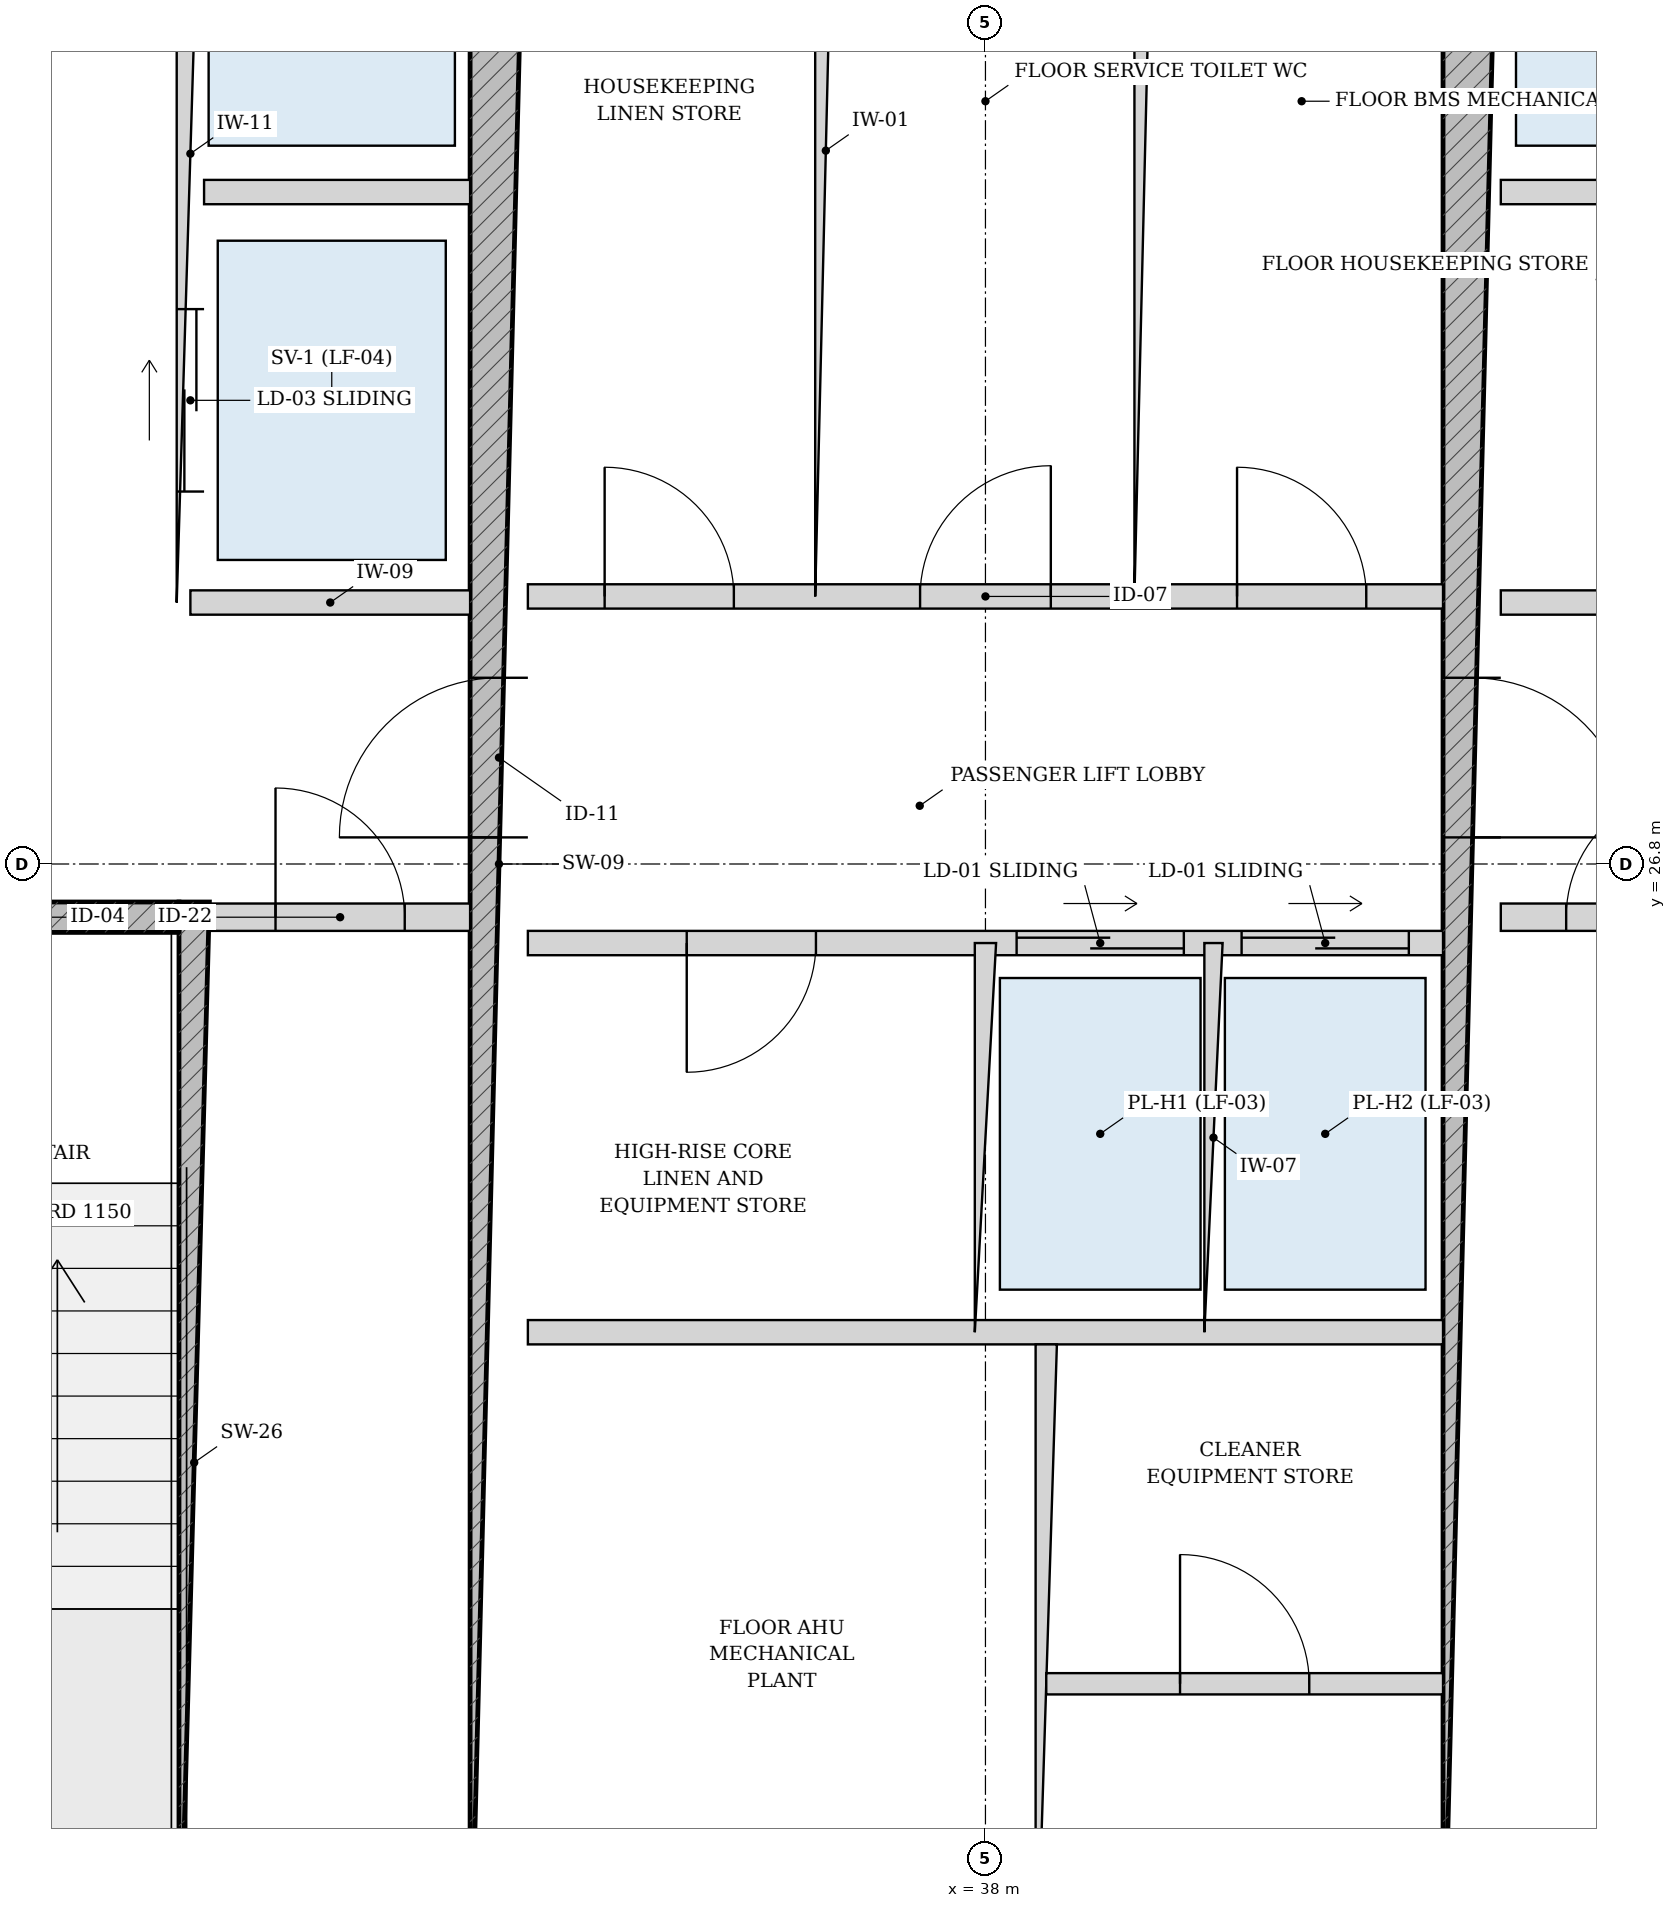
"""IFC4 building model, lengths in metres.
Left out: names, types, materials, properties, quantities, classifications, styles, units other than length and angle.
Written with IfcOpenShell. Run it as: python <this file> out.ifc"""

import sys

from ifc_helpers import new_model, si_unit, direction, frame, frame_2d, origin, place, context, subcontext, project, spatial, rectangle, extrude, source, transform, mapped, element, fill, save


model = new_model("IFC4")
c1 = context("Model", 3, precision=1e-05, world=origin(), true_north=direction((-0.2419218956, 0.970295726276)))
c2 = subcontext(c1, "Body", "Model", "MODEL_VIEW")
j1 = project(units=[si_unit("LENGTHUNIT", "METRE"), si_unit("PLANEANGLEUNIT", "RADIAN")], contexts=[c1])
p1 = place(None, origin())
s1 = spatial("IfcSite", under=j1, at=p1, CompositionType="ELEMENT")
p2 = place(p1, origin())
s2 = spatial("IfcBuilding", under=s1, at=p2, CompositionType="ELEMENT")
p3 = place(p2, frame((0.0, 0.0, 281.95)))
s3 = spatial("IfcBuildingStorey", under=s2, at=p3, CompositionType="ELEMENT", Elevation=281.95)
p4 = place(p3, frame((32.795, 19.175, 0.0), z_axis=(0.0, 0.0, 1.0), x_axis=(0.0, 1.0, 0.0)))
e1 = element("IfcWall", 1, at=p4, inside=s3, PredefinedType="SOLIDWALL", context=c2, shape_type="SweptSolid", body=[
    extrude(rectangle(XDim=7.375, YDim=0.2, at=frame_2d((3.688, 0.0))), origin(), (0.0, 0.0, 1.0), 3.49),
])
p5 = place(p3, frame((29.375, 26.45, 0.0), z_axis=(0.0, 0.0, 1.0), x_axis=(1.0, 0.0, 0.0)))
e2 = element("IfcWall", 2, at=p5, inside=s3, PredefinedType="SOLIDWALL", context=c2, shape_type="SweptSolid", body=[
    extrude(rectangle(XDim=3.32, YDim=0.2, at=frame_2d((1.66, 0.0))), origin(), (0.0, 0.0, 1.0), 3.49),
])
p6 = place(p5, frame((1.185, 0.0, 0.0)))
e3 = element("IfcOpeningElement", 3, at=p6, cuts=e2, PredefinedType="OPENING", context=c2, shape_type="SweptSolid", body=[
    extrude(rectangle(XDim=0.95, YDim=2.15, at=frame_2d((0.475, 1.075))), frame((0.0, 0.11, 0.0), z_axis=(0.0, -1.0, 0.0), x_axis=(1.0, 0.0, 0.0)), (0.0, 0.0, 1.0), 0.22),
])
p7 = place(p3, frame((34.8, 19.175, 0.0), z_axis=(0.0, 0.0, 1.0), x_axis=(0.0, 1.0, 0.0)))
e4 = element("IfcWall", 4, at=p7, inside=s3, PredefinedType="SHEAR", context=c2, shape_type="SweptSolid", body=[
    extrude(rectangle(XDim=15.25, YDim=0.38, at=frame_2d((7.625, 0.0))), origin(), (0.0, 0.0, 1.0), 3.49),
])
p8 = place(p7, frame((7.8, 0.0, 0.0)))
e5 = element("IfcOpeningElement", 5, at=p8, cuts=e4, PredefinedType="OPENING", context=c2, shape_type="SweptSolid", body=[
    extrude(rectangle(XDim=1.05, YDim=2.15, at=frame_2d((0.525, 1.075))), frame((0.0, 0.2, 0.0), z_axis=(0.0, -1.0, 0.0), x_axis=(1.0, 0.0, 0.0)), (0.0, 0.0, 1.0), 0.4),
])
p9 = place(p3, frame((41.2, 19.175, 0.0), z_axis=(0.0, 0.0, 1.0), x_axis=(0.0, 1.0, 0.0)))
e6 = element("IfcWall", 6, at=p9, inside=s3, PredefinedType="SHEAR", context=c2, shape_type="SweptSolid", body=[
    extrude(rectangle(XDim=15.25, YDim=0.38, at=frame_2d((7.625, 0.0))), origin(), (0.0, 0.0, 1.0), 3.49),
])
p10 = place(p9, frame((7.8, 0.0, 0.0)))
e7 = element("IfcOpeningElement", 7, at=p10, cuts=e6, PredefinedType="OPENING", context=c2, shape_type="SweptSolid", body=[
    extrude(rectangle(XDim=1.05, YDim=2.15, at=frame_2d((0.525, 1.075))), frame((0.0, 0.2, 0.0), z_axis=(0.0, -1.0, 0.0), x_axis=(1.0, 0.0, 0.0)), (0.0, 0.0, 1.0), 0.4),
])
p11 = place(p3, frame((32.9, 26.45, 0.0), z_axis=(0.0, 0.0, 1.0), x_axis=(1.0, 0.0, 0.0)))
e8 = element("IfcWall", 8, at=p11, inside=s3, PredefinedType="PARTITIONING", context=c2, shape_type="SweptSolid", body=[
    extrude(rectangle(XDim=1.71, YDim=0.18, at=frame_2d((0.855, 0.0))), origin(), (0.0, 0.0, 1.0), 3.49),
])
p12 = place(p11, frame((0.43, 0.0, 0.0)))
e9 = element("IfcOpeningElement", 9, at=p12, cuts=e8, PredefinedType="OPENING", context=c2, shape_type="SweptSolid", body=[
    extrude(rectangle(XDim=0.85, YDim=2.1, at=frame_2d((0.425, 1.05))), frame((0.0, 0.1, 0.0), z_axis=(0.0, -1.0, 0.0), x_axis=(1.0, 0.0, 0.0)), (0.0, 0.0, 1.0), 0.2),
])
p13 = place(p3, frame((41.39, 26.45, 0.0), z_axis=(0.0, 0.0, 1.0), x_axis=(1.0, 0.0, 0.0)))
e10 = element("IfcWall", 10, at=p13, inside=s3, PredefinedType="PARTITIONING", context=c2, shape_type="SweptSolid", body=[
    extrude(rectangle(XDim=1.71, YDim=0.18, at=frame_2d((0.855, 0.0))), origin(), (0.0, 0.0, 1.0), 3.49),
])
p14 = place(p13, frame((0.43, 0.0, 0.0)))
e11 = element("IfcOpeningElement", 11, at=p14, cuts=e10, PredefinedType="OPENING", context=c2, shape_type="SweptSolid", body=[
    extrude(rectangle(XDim=0.85, YDim=2.1, at=frame_2d((0.425, 1.05))), frame((0.0, 0.1, 0.0), z_axis=(0.0, -1.0, 0.0), x_axis=(1.0, 0.0, 0.0)), (0.0, 0.0, 1.0), 0.2),
])
p15 = place(p3, frame((32.77, 28.52, 0.0), z_axis=(0.0, 0.0, 1.0), x_axis=(0.0, 1.0, 0.0)))
e12 = element("IfcWall", 12, at=p15, inside=s3, PredefinedType="PARTITIONING", context=c2, shape_type="SweptSolid", body=[
    extrude(rectangle(XDim=5.905, YDim=0.18, at=frame_2d((2.953, 0.0))), origin(), (0.0, 0.0, 1.0), 3.49),
])
p16 = place(p15, frame((3.655, 0.0, 0.0)))
e13 = element("IfcOpeningElement", 13, at=p16, cuts=e12, PredefinedType="OPENING", context=c2, shape_type="SweptSolid", body=[
    extrude(rectangle(XDim=1.15, YDim=2.2, at=frame_2d((0.575, 1.1))), frame((0.0, 0.1, 0.0), z_axis=(0.0, -1.0, 0.0), x_axis=(1.0, 0.0, 0.0)), (0.0, 0.0, 1.0), 0.2),
])
p17 = place(p15, frame((0.73, 0.0, 0.0)))
e14 = element("IfcOpeningElement", 14, at=p17, cuts=e12, PredefinedType="OPENING", context=c2, shape_type="SweptSolid", body=[
    extrude(rectangle(XDim=1.2, YDim=2.25, at=frame_2d((0.6, 1.125))), frame((0.0, 0.1, 0.0), z_axis=(0.0, -1.0, 0.0), x_axis=(1.0, 0.0, 0.0)), (0.0, 0.0, 1.0), 0.2),
])
p18 = place(p3, frame((32.86, 31.22, 0.0), z_axis=(0.0, 0.0, 1.0), x_axis=(1.0, 0.0, 0.0)))
e15 = element("IfcWall", 15, at=p18, inside=s3, PredefinedType="PARTITIONING", context=c2, shape_type="SweptSolid", body=[
    extrude(rectangle(XDim=1.75, YDim=0.16, at=frame_2d((0.875, 0.0))), origin(), (0.0, 0.0, 1.0), 3.49),
])
p19 = place(p3, frame((32.77, 28.52, 0.0), z_axis=(0.0, 0.0, 1.0), x_axis=(1.0, 0.0, 0.0)))
e16 = element("IfcWall", 16, at=p19, inside=s3, PredefinedType="PARTITIONING", context=c2, shape_type="SweptSolid", body=[
    extrude(rectangle(XDim=1.84, YDim=0.16, at=frame_2d((0.92, 0.0))), origin(), (0.0, 0.0, 1.0), 3.49),
])
p20 = place(p3, frame((41.39, 31.22, 0.0), z_axis=(0.0, 0.0, 1.0), x_axis=(1.0, 0.0, 0.0)))
e17 = element("IfcWall", 17, at=p20, inside=s3, PredefinedType="PARTITIONING", context=c2, shape_type="SweptSolid", body=[
    extrude(rectangle(XDim=1.75, YDim=0.16, at=frame_2d((0.875, 0.0))), origin(), (0.0, 0.0, 1.0), 3.49),
])
p21 = place(p3, frame((41.39, 28.52, 0.0), z_axis=(0.0, 0.0, 1.0), x_axis=(1.0, 0.0, 0.0)))
e18 = element("IfcWall", 18, at=p21, inside=s3, PredefinedType="PARTITIONING", context=c2, shape_type="SweptSolid", body=[
    extrude(rectangle(XDim=1.84, YDim=0.16, at=frame_2d((0.92, 0.0))), origin(), (0.0, 0.0, 1.0), 3.49),
])
p22 = place(p3, frame((34.99, 28.56, 0.0), z_axis=(0.0, 0.0, 1.0), x_axis=(1.0, 0.0, 0.0)))
e19 = element("IfcWall", 19, at=p22, inside=s3, PredefinedType="PARTITIONING", context=c2, shape_type="SweptSolid", body=[
    extrude(rectangle(XDim=6.02, YDim=0.16, at=frame_2d((3.01, 0.0))), origin(), (0.0, 0.0, 1.0), 3.49),
])
p23 = place(p22, frame((0.505, 0.0, 0.0)))
e20 = element("IfcOpeningElement", 20, at=p23, cuts=e19, PredefinedType="OPENING", context=c2, shape_type="SweptSolid", body=[
    extrude(rectangle(XDim=0.85, YDim=2.1, at=frame_2d((0.425, 1.05))), frame((0.0, 0.09, 0.0), z_axis=(0.0, -1.0, 0.0), x_axis=(1.0, 0.0, 0.0)), (0.0, 0.0, 1.0), 0.18),
])
p24 = place(p22, frame((2.58, 0.0, 0.0)))
e21 = element("IfcOpeningElement", 21, at=p24, cuts=e19, PredefinedType="OPENING", context=c2, shape_type="SweptSolid", body=[
    extrude(rectangle(XDim=0.86, YDim=2.1, at=frame_2d((0.43, 1.05))), frame((0.0, 0.09, 0.0), z_axis=(0.0, -1.0, 0.0), x_axis=(1.0, 0.0, 0.0)), (0.0, 0.0, 1.0), 0.18),
])
p25 = place(p22, frame((4.665, 0.0, 0.0)))
e22 = element("IfcOpeningElement", 22, at=p25, cuts=e19, PredefinedType="OPENING", context=c2, shape_type="SweptSolid", body=[
    extrude(rectangle(XDim=0.85, YDim=2.1, at=frame_2d((0.425, 1.05))), frame((0.0, 0.09, 0.0), z_axis=(0.0, -1.0, 0.0), x_axis=(1.0, 0.0, 0.0)), (0.0, 0.0, 1.0), 0.18),
])
for number, where, z_axis, x_axis in (
    (23, (36.95, 28.56, 0.0), (0.0, 0.0, 1.0), (0.0, 1.0, 0.0)),
    (24, (39.05, 28.56, 0.0), (0.0, 0.0, 1.0), (0.0, 1.0, 0.0)),
):
    element("IfcWall", number, at=place(p3, frame(where, z_axis=z_axis, x_axis=x_axis)), inside=s3, PredefinedType="PARTITIONING", context=c2, shape_type="SweptSolid", body=[
        extrude(rectangle(XDim=5.865, YDim=0.14, at=frame_2d((2.933, 0.0))), origin(), (0.0, 0.0, 1.0), 3.49),
    ])
p26 = place(p3, frame((34.99, 26.28, 0.0), z_axis=(0.0, 0.0, 1.0), x_axis=(1.0, 0.0, 0.0)))
e25 = element("IfcWall", 25, at=p26, inside=s3, PredefinedType="PARTITIONING", context=c2, shape_type="SweptSolid", body=[
    extrude(rectangle(XDim=6.02, YDim=0.16, at=frame_2d((3.01, 0.0))), origin(), (0.0, 0.0, 1.0), 3.49),
])
p27 = place(p26, frame((1.045, 0.0, 0.0)))
e26 = element("IfcOpeningElement", 26, at=p27, cuts=e25, PredefinedType="OPENING", context=c2, shape_type="SweptSolid", body=[
    extrude(rectangle(XDim=0.85, YDim=2.1, at=frame_2d((0.425, 1.05))), frame((0.0, 0.09, 0.0), z_axis=(0.0, -1.0, 0.0), x_axis=(1.0, 0.0, 0.0)), (0.0, 0.0, 1.0), 0.18),
])
p28 = place(p26, frame((3.215, 0.0, 0.0)))
e27 = element("IfcOpeningElement", 27, at=p28, cuts=e25, PredefinedType="OPENING", context=c2, shape_type="SweptSolid", body=[
    extrude(rectangle(XDim=1.1, YDim=2.2, at=frame_2d((0.55, 1.1))), frame((0.0, 0.09, 0.0), z_axis=(0.0, -1.0, 0.0), x_axis=(1.0, 0.0, 0.0)), (0.0, 0.0, 1.0), 0.18),
])
p29 = place(p26, frame((4.695, 0.0, 0.0)))
e28 = element("IfcOpeningElement", 28, at=p29, cuts=e25, PredefinedType="OPENING", context=c2, shape_type="SweptSolid", body=[
    extrude(rectangle(XDim=1.1, YDim=2.2, at=frame_2d((0.55, 1.1))), frame((0.0, 0.09, 0.0), z_axis=(0.0, -1.0, 0.0), x_axis=(1.0, 0.0, 0.0)), (0.0, 0.0, 1.0), 0.18),
])
p30 = place(p3, frame((34.99, 23.72, 0.0), z_axis=(0.0, 0.0, 1.0), x_axis=(1.0, 0.0, 0.0)))
e29 = element("IfcWall", 29, at=p30, inside=s3, PredefinedType="PARTITIONING", context=c2, shape_type="SweptSolid", body=[
    extrude(rectangle(XDim=6.02, YDim=0.16, at=frame_2d((3.01, 0.0))), origin(), (0.0, 0.0, 1.0), 3.49),
])
p31 = place(p3, frame((38.0, 23.72, 0.0), z_axis=(0.0, 0.0, 1.0), x_axis=(0.0, 1.0, 0.0)))
e30 = element("IfcWall", 30, at=p31, inside=s3, PredefinedType="PARTITIONING", context=c2, shape_type="SweptSolid", body=[
    extrude(rectangle(XDim=2.56, YDim=0.14, at=frame_2d((1.28, 0.0))), origin(), (0.0, 0.0, 1.0), 3.49),
])
p32 = place(p3, frame((39.5, 23.72, 0.0), z_axis=(0.0, 0.0, 1.0), x_axis=(0.0, 1.0, 0.0)))
e31 = element("IfcWall", 31, at=p32, inside=s3, PredefinedType="PARTITIONING", context=c2, shape_type="SweptSolid", body=[
    extrude(rectangle(XDim=2.56, YDim=0.12, at=frame_2d((1.28, 0.0))), origin(), (0.0, 0.0, 1.0), 3.49),
])
p33 = place(p3, frame((38.4, 19.175, 0.0), z_axis=(0.0, 0.0, 1.0), x_axis=(0.0, 1.0, 0.0)))
e32 = element("IfcWall", 32, at=p33, inside=s3, PredefinedType="PARTITIONING", context=c2, shape_type="SweptSolid", body=[
    extrude(rectangle(XDim=4.465, YDim=0.14, at=frame_2d((2.232, 0.0))), origin(), (0.0, 0.0, 1.0), 3.49),
])
p34 = place(p3, frame((38.4, 21.407, 0.0), z_axis=(0.0, 0.0, 1.0), x_axis=(1.0, 0.0, 0.0)))
e33 = element("IfcWall", 33, at=p34, inside=s3, PredefinedType="PARTITIONING", context=c2, shape_type="SweptSolid", body=[
    extrude(rectangle(XDim=2.61, YDim=0.14, at=frame_2d((1.305, 0.0))), origin(), (0.0, 0.0, 1.0), 3.49),
])
p35 = place(p34, frame((0.88, 0.0, 0.0)))
e34 = element("IfcOpeningElement", 34, at=p35, cuts=e33, PredefinedType="OPENING", context=c2, shape_type="SweptSolid", body=[
    extrude(rectangle(XDim=0.85, YDim=2.1, at=frame_2d((0.425, 1.05))), frame((0.0, 0.08, 0.0), z_axis=(0.0, -1.0, 0.0), x_axis=(1.0, 0.0, 0.0)), (0.0, 0.0, 1.0), 0.16),
])
m1 = source(origin(), c2, "Body", "SweptSolid", [
    extrude(rectangle(XDim=1.05, YDim=2.15, at=frame_2d((0.525, 1.075))), frame((0.0, 0.025, 0.0), z_axis=(0.0, -1.0, 0.0), x_axis=(1.0, 0.0, 0.0)), (0.0, 0.0, 1.0), 0.05),
])
p36 = place(p8, origin())
e35 = element("IfcDoor", 35, at=p36, inside=s3, OperationType="SINGLE_SWING_LEFT", PredefinedType="DOOR", context=c2, shape_type="MappedRepresentation", body=[
    mapped(m1, transform((0.0, 0.0, 0.0), scale=1.0)),
])
fill(e5, e35)
p37 = place(p10, frame((1.05, 0.0, 0.0), z_axis=(0.0, 0.0, 1.0), x_axis=(-1.0, 0.0, 0.0)))
e36 = element("IfcDoor", 36, at=p37, inside=s3, OperationType="SINGLE_SWING_RIGHT", PredefinedType="DOOR", context=c2, shape_type="MappedRepresentation", body=[
    mapped(m1, transform((0.0, 0.0, 0.0), scale=1.0)),
])
fill(e7, e36)
m2 = source(origin(), c2, "Body", "SweptSolid", [
    extrude(rectangle(XDim=0.85, YDim=2.1, at=frame_2d((0.425, 1.05))), frame((0.0, 0.025, 0.0), z_axis=(0.0, -1.0, 0.0), x_axis=(1.0, 0.0, 0.0)), (0.0, 0.0, 1.0), 0.05),
])
p38 = place(p12, origin())
e37 = element("IfcDoor", 37, at=p38, inside=s3, OperationType="SINGLE_SWING_LEFT", PredefinedType="DOOR", context=c2, shape_type="MappedRepresentation", body=[
    mapped(m2, transform((0.0, 0.0, 0.0), scale=1.0)),
])
fill(e9, e37)
p39 = place(p14, origin())
e38 = element("IfcDoor", 38, at=p39, inside=s3, OperationType="SINGLE_SWING_RIGHT", PredefinedType="DOOR", context=c2, shape_type="MappedRepresentation", body=[
    mapped(m2, transform((0.0, 0.0, 0.0), scale=1.0)),
])
fill(e11, e38)
p40 = place(p23, origin())
e39 = element("IfcDoor", 39, at=p40, inside=s3, OperationType="SINGLE_SWING_LEFT", PredefinedType="DOOR", context=c2, shape_type="MappedRepresentation", body=[
    mapped(m2, transform((0.0, 0.0, 0.0), scale=1.0)),
])
fill(e20, e39)
m3 = source(origin(), c2, "Body", "SweptSolid", [
    extrude(rectangle(XDim=0.86, YDim=2.1, at=frame_2d((0.43, 1.05))), frame((0.0, 0.025, 0.0), z_axis=(0.0, -1.0, 0.0), x_axis=(1.0, 0.0, 0.0)), (0.0, 0.0, 1.0), 0.05),
])
p41 = place(p24, origin())
e40 = element("IfcDoor", 40, at=p41, inside=s3, OperationType="SINGLE_SWING_RIGHT", PredefinedType="DOOR", context=c2, shape_type="MappedRepresentation", body=[
    mapped(m3, transform((0.0, 0.0, 0.0), scale=1.0)),
])
fill(e21, e40)
p42 = place(p25, origin())
e41 = element("IfcDoor", 41, at=p42, inside=s3, OperationType="SINGLE_SWING_LEFT", PredefinedType="DOOR", context=c2, shape_type="MappedRepresentation", body=[
    mapped(m2, transform((0.0, 0.0, 0.0), scale=1.0)),
])
fill(e22, e41)
p43 = place(p27, frame((0.85, 0.0, 0.0), z_axis=(0.0, 0.0, 1.0), x_axis=(-1.0, 0.0, 0.0)))
e42 = element("IfcDoor", 42, at=p43, inside=s3, OperationType="SINGLE_SWING_RIGHT", PredefinedType="DOOR", context=c2, shape_type="MappedRepresentation", body=[
    mapped(m2, transform((0.0, 0.0, 0.0), scale=1.0)),
])
fill(e26, e42)
p44 = place(p35, origin())
e43 = element("IfcDoor", 43, at=p44, inside=s3, OperationType="SINGLE_SWING_LEFT", PredefinedType="DOOR", context=c2, shape_type="MappedRepresentation", body=[
    mapped(m2, transform((0.0, 0.0, 0.0), scale=1.0)),
])
fill(e34, e43)
m4 = source(origin(), c2, "Body", "SweptSolid", [
    extrude(rectangle(XDim=1.2, YDim=2.25, at=frame_2d((0.6, 1.125))), frame((0.0, 0.025, 0.0), z_axis=(0.0, -1.0, 0.0), x_axis=(1.0, 0.0, 0.0)), (0.0, 0.0, 1.0), 0.05),
])
p45 = place(p17, origin())
e44 = element("IfcDoor", 44, at=p45, inside=s3, OperationType="DOUBLE_DOOR_SLIDING", PredefinedType="DOOR", context=c2, shape_type="MappedRepresentation", body=[
    mapped(m4, transform((0.0, 0.0, 0.0), scale=1.0)),
])
fill(e14, e44)
m5 = source(origin(), c2, "Body", "SweptSolid", [
    extrude(rectangle(XDim=1.1, YDim=2.2, at=frame_2d((0.55, 1.1))), frame((0.0, 0.025, 0.0), z_axis=(0.0, -1.0, 0.0), x_axis=(1.0, 0.0, 0.0)), (0.0, 0.0, 1.0), 0.05),
])
p46 = place(p28, origin())
e45 = element("IfcDoor", 45, at=p46, inside=s3, OperationType="DOUBLE_DOOR_SLIDING", PredefinedType="DOOR", context=c2, shape_type="MappedRepresentation", body=[
    mapped(m5, transform((0.0, 0.0, 0.0), scale=1.0)),
])
fill(e27, e45)
p47 = place(p29, origin())
e46 = element("IfcDoor", 46, at=p47, inside=s3, OperationType="DOUBLE_DOOR_SLIDING", PredefinedType="DOOR", context=c2, shape_type="MappedRepresentation", body=[
    mapped(m5, transform((0.0, 0.0, 0.0), scale=1.0)),
])
fill(e28, e46)
save(model, sys.argv[1])
